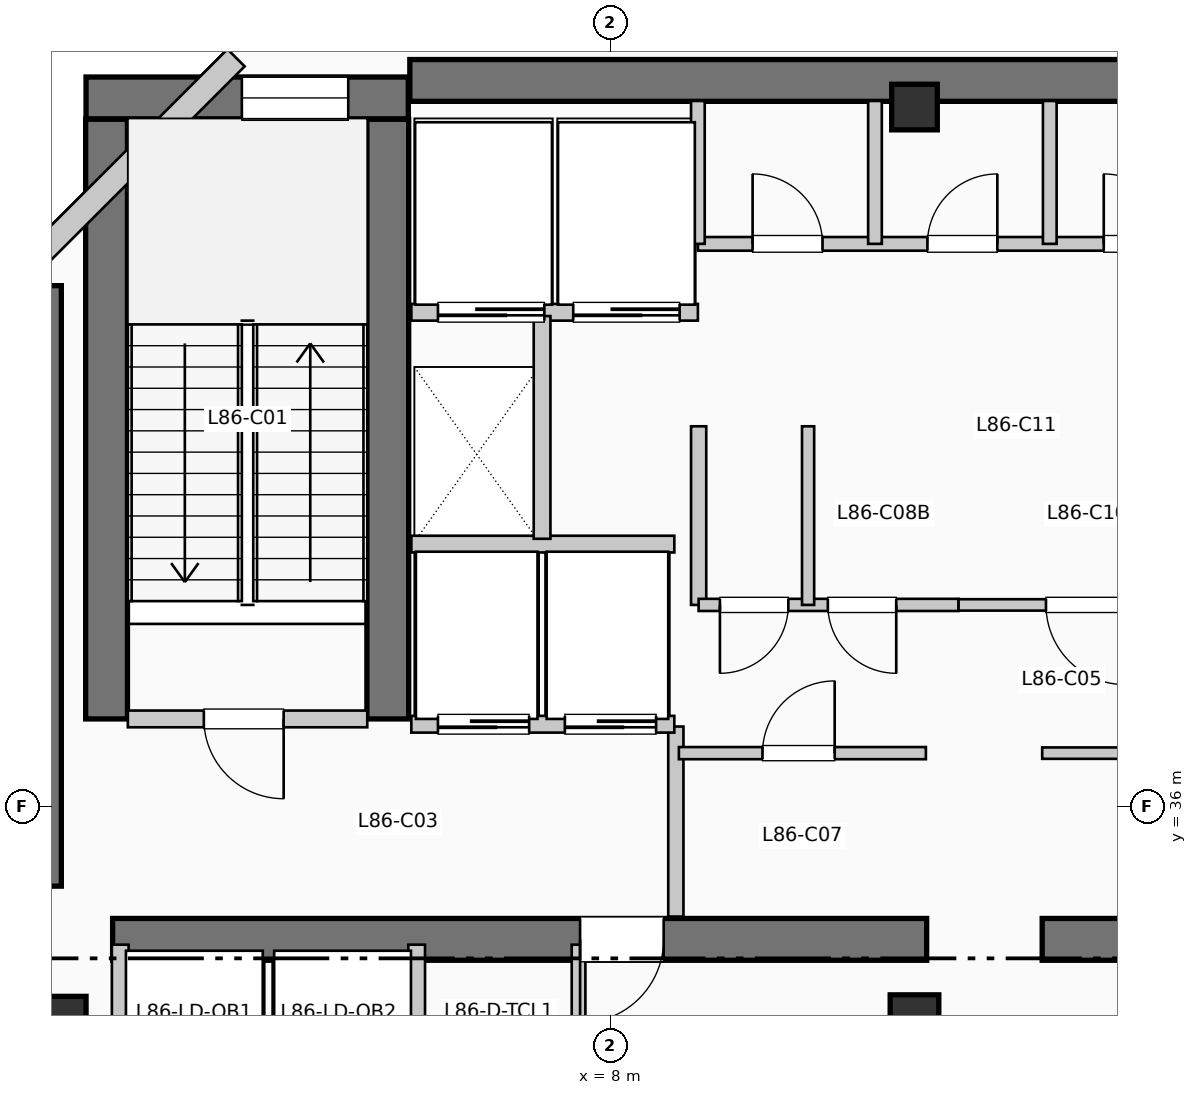
"""IFC4 building model, lengths in metres.
Left out: names, types, materials, properties, quantities, classifications, styles, units other than length and angle.
Written with IfcOpenShell. Run it as: python <this file> out.ifc"""

import sys

from ifc_helpers import new_model, si_unit, direction, frame, frame_2d, origin, origin_2d, place, context, subcontext, project, spatial, rectangle, extrude, element, fill, save


model = new_model("IFC4")
c1 = context("Model", 3, precision=1e-05, world=origin(), true_north=direction((0.0, 1.0)))
c2 = subcontext(c1, "Body", "Model", "MODEL_VIEW")
j1 = project(units=[si_unit("LENGTHUNIT", "METRE"), si_unit("PLANEANGLEUNIT", "RADIAN")], contexts=[c1])
p1 = place(None, origin())
s1 = spatial("IfcSite", under=j1, at=p1, CompositionType="ELEMENT")
p2 = place(p1, origin())
s2 = spatial("IfcBuilding", under=s1, at=p2, CompositionType="ELEMENT")
p3 = place(p2, frame((0.0, 0.0, 352.11)))
s3 = spatial("IfcBuildingStorey", under=s2, at=p3, CompositionType="ELEMENT", Elevation=352.11)
p4 = place(p3, frame((5.36, 45.55, 0.0), z_axis=(0.0, 0.0, 1.0), x_axis=(1.0, 0.0, 0.0)))
e1 = element("IfcWall", 1, at=p4, inside=s3, PredefinedType="SHEAR", context=c2, shape_type="SweptSolid", body=[
    extrude(rectangle(XDim=13.98, YDim=0.55, at=frame_2d((6.99, 0.0))), origin(), (0.0, 0.0, 1.0), 4.62),
])
p5 = place(p3, frame((0.5, 34.95, 0.0), z_axis=(0.0, 0.0, 1.0), x_axis=(0.0, 1.0, 0.0)))
e2 = element("IfcWall", 2, at=p5, inside=s3, PredefinedType="SHEAR", context=c2, shape_type="SweptSolid", body=[
    extrude(rectangle(XDim=7.9, YDim=0.55, at=frame_2d((3.95, 0.0))), origin(), (0.0, 0.0, 1.0), 4.62),
])
p6 = place(p3, frame((1.45, 34.25, 0.0), z_axis=(0.0, 0.0, 1.0), x_axis=(1.0, 0.0, 0.0)))
e3 = element("IfcWall", 3, at=p6, inside=s3, PredefinedType="SHEAR", context=c2, shape_type="SweptSolid", body=[
    extrude(rectangle(XDim=10.71, YDim=0.55, at=frame_2d((5.355, 0.0))), origin(), (0.0, 0.0, 1.0), 4.62),
])
p7 = place(p6, frame((7.25, 0.0, 0.0), z_axis=(0.0, 0.0, 1.0), x_axis=(-1.0, 0.0, 0.0)))
e4 = element("IfcOpeningElement", 4, at=p7, cuts=e3, PredefinedType="OPENING", context=c2, shape_type="SweptSolid", body=[
    extrude(rectangle(XDim=1.1, YDim=2.15, at=frame_2d((0.55, 1.075))), frame((0.0, 0.285, 0.0), z_axis=(0.0, -1.0, 0.0), x_axis=(1.0, 0.0, 0.0)), (0.0, 0.0, 1.0), 0.57),
])
p8 = place(p3, frame((13.68, 34.25, 0.0), z_axis=(0.0, 0.0, 1.0), x_axis=(1.0, 0.0, 0.0)))
e5 = element("IfcWall", 5, at=p8, inside=s3, PredefinedType="SHEAR", context=c2, shape_type="SweptSolid", body=[
    extrude(rectangle(XDim=6.12, YDim=0.55, at=frame_2d((3.06, 0.0))), origin(), (0.0, 0.0, 1.0), 4.62),
])
for number, where, z_axis, x_axis in (
    (6, (1.37, 37.15, 0.0), (0.0, 0.0, 1.0), (0.0, 1.0, 0.0)),
    (7, (5.07, 37.15, 0.0), (0.0, 0.0, 1.0), (0.0, 1.0, 0.0)),
):
    element("IfcWall", number, at=place(p3, frame(where, z_axis=z_axis, x_axis=x_axis)), inside=s3, PredefinedType="SHEAR", context=c2, shape_type="SweptSolid", body=[
        extrude(rectangle(XDim=7.89, YDim=0.55, at=frame_2d((3.945, 0.0))), origin(), (0.0, 0.0, 1.0), 4.62),
    ])
p9 = place(p3, frame((1.1, 45.32, 0.0), z_axis=(0.0, 0.0, 1.0), x_axis=(1.0, 0.0, 0.0)))
e8 = element("IfcWall", 8, at=p9, inside=s3, PredefinedType="SHEAR", context=c2, shape_type="SweptSolid", body=[
    extrude(rectangle(XDim=4.24, YDim=0.55, at=frame_2d((2.12, 0.0))), origin(), (0.0, 0.0, 1.0), 4.62),
])
p10 = place(p9, frame((2.05, 0.0, 1.05)))
e9 = element("IfcOpeningElement", 9, at=p10, cuts=e8, PredefinedType="OPENING", context=c2, shape_type="SweptSolid", body=[
    extrude(rectangle(XDim=1.4, YDim=1.8, at=frame_2d((0.7, 0.9))), frame((0.0, 0.285, 0.0), z_axis=(0.0, -1.0, 0.0), x_axis=(1.0, 0.0, 0.0)), (0.0, 0.0, 1.0), 0.57),
])
p11 = place(p3, frame((0.8, 33.2, 0.0), z_axis=(0.0, 0.0, 1.0), x_axis=(1.0, 0.0, 0.0)))
e10 = element("IfcColumn", 10, at=p11, inside=s3, PredefinedType="COLUMN", context=c2, shape_type="SweptSolid", body=[
    extrude(rectangle(XDim=0.6, YDim=0.6, at=origin_2d()), origin(), (0.0, 0.0, 1.0), 4.62),
])
p12 = place(p3, frame((12.0, 33.2, 0.0), z_axis=(0.0, 0.0, 1.0), x_axis=(1.0, 0.0, 0.0)))
e11 = element("IfcColumn", 11, at=p12, inside=s3, PredefinedType="COLUMN", context=c2, shape_type="SweptSolid", body=[
    extrude(rectangle(XDim=0.64, YDim=0.64, at=origin_2d()), origin(), (0.0, 0.0, 1.0), 4.62),
])
p13 = place(p3, frame((12.0, 45.2, 0.0), z_axis=(0.0, 0.0, 1.0), x_axis=(1.0, 0.0, 0.0)))
e12 = element("IfcColumn", 12, at=p13, inside=s3, PredefinedType="COLUMN", context=c2, shape_type="SweptSolid", body=[
    extrude(rectangle(XDim=0.6, YDim=0.6, at=origin_2d()), origin(), (0.0, 0.0, 1.0), 4.62),
])
p14 = place(p3, frame((3.074, 45.848, 0.0), z_axis=(0.0, 0.0, 1.0), x_axis=(-0.707106781187, -0.707106781187, 0.0)))
e13 = element("IfcWall", 13, at=p14, inside=s3, PredefinedType="SOLIDWALL", context=c2, shape_type="SweptSolid", body=[
    extrude(rectangle(XDim=4.133, YDim=0.32, at=frame_2d((2.066, 0.0))), origin(), (0.0, 0.0, 1.0), 4.37),
])
p15 = place(p3, frame((1.65, 37.15, 0.0), z_axis=(0.0, 0.0, 1.0), x_axis=(1.0, 0.0, 0.0)))
e14 = element("IfcWall", 14, at=p15, inside=s3, PredefinedType="PARTITIONING", context=c2, shape_type="SweptSolid", body=[
    extrude(rectangle(XDim=3.15, YDim=0.22, at=frame_2d((1.575, 0.0))), origin(), (0.0, 0.0, 1.0), 4.37),
])
p16 = place(p15, frame((2.05, 0.0, 0.0), z_axis=(0.0, 0.0, 1.0), x_axis=(-1.0, 0.0, 0.0)))
e15 = element("IfcOpeningElement", 15, at=p16, cuts=e14, PredefinedType="OPENING", context=c2, shape_type="SweptSolid", body=[
    extrude(rectangle(XDim=1.05, YDim=2.15, at=frame_2d((0.525, 1.075))), frame((0.0, 0.12, 0.0), z_axis=(0.0, -1.0, 0.0), x_axis=(1.0, 0.0, 0.0)), (0.0, 0.0, 1.0), 0.24),
])
p17 = place(p3, frame((8.86, 34.55, 0.0), z_axis=(0.0, 0.0, 1.0), x_axis=(0.0, 1.0, 0.0)))
e16 = element("IfcWall", 16, at=p17, inside=s3, PredefinedType="PARTITIONING", context=c2, shape_type="SweptSolid", body=[
    extrude(rectangle(XDim=2.5, YDim=0.2, at=frame_2d((1.25, 0.0))), origin(), (0.0, 0.0, 1.0), 4.37),
])
p18 = place(p3, frame((5.38, 37.08, 0.0), z_axis=(0.0, 0.0, 1.0), x_axis=(1.0, 0.0, 0.0)))
e17 = element("IfcWall", 17, at=p18, inside=s3, PredefinedType="PARTITIONING", context=c2, shape_type="SweptSolid", body=[
    extrude(rectangle(XDim=3.46, YDim=0.22, at=frame_2d((1.73, 0.0))), origin(), (0.0, 0.0, 1.0), 4.37),
])
p19 = place(p18, frame((1.55, 0.0, 0.0), z_axis=(0.0, 0.0, 1.0), x_axis=(-1.0, 0.0, 0.0)))
e18 = element("IfcOpeningElement", 18, at=p19, cuts=e17, PredefinedType="OPENING", context=c2, shape_type="SweptSolid", body=[
    extrude(rectangle(XDim=1.2, YDim=2.2, at=frame_2d((0.6, 1.1))), frame((0.0, 0.12, 0.0), z_axis=(0.0, -1.0, 0.0), x_axis=(1.0, 0.0, 0.0)), (0.0, 0.0, 1.0), 0.24),
])
p20 = place(p18, frame((3.22, 0.0, 0.0), z_axis=(0.0, 0.0, 1.0), x_axis=(-1.0, 0.0, 0.0)))
e19 = element("IfcOpeningElement", 19, at=p20, cuts=e17, PredefinedType="OPENING", context=c2, shape_type="SweptSolid", body=[
    extrude(rectangle(XDim=1.2, YDim=2.2, at=frame_2d((0.6, 1.1))), frame((0.0, 0.12, 0.0), z_axis=(0.0, -1.0, 0.0), x_axis=(1.0, 0.0, 0.0)), (0.0, 0.0, 1.0), 0.24),
])
p21 = place(p3, frame((5.38, 39.45, 0.0), z_axis=(0.0, 0.0, 1.0), x_axis=(1.0, 0.0, 0.0)))
e20 = element("IfcWall", 20, at=p21, inside=s3, PredefinedType="PARTITIONING", context=c2, shape_type="SweptSolid", body=[
    extrude(rectangle(XDim=3.46, YDim=0.22, at=frame_2d((1.73, 0.0))), origin(), (0.0, 0.0, 1.0), 4.37),
])
p22 = place(p3, frame((5.38, 42.5, 0.0), z_axis=(0.0, 0.0, 1.0), x_axis=(1.0, 0.0, 0.0)))
e21 = element("IfcWall", 21, at=p22, inside=s3, PredefinedType="PARTITIONING", context=c2, shape_type="SweptSolid", body=[
    extrude(rectangle(XDim=3.77, YDim=0.22, at=frame_2d((1.885, 0.0))), origin(), (0.0, 0.0, 1.0), 4.37),
])
p23 = place(p22, frame((1.75, 0.0, 0.0), z_axis=(0.0, 0.0, 1.0), x_axis=(-1.0, 0.0, 0.0)))
e22 = element("IfcOpeningElement", 22, at=p23, cuts=e21, PredefinedType="OPENING", context=c2, shape_type="SweptSolid", body=[
    extrude(rectangle(XDim=1.4, YDim=2.2, at=frame_2d((0.7, 1.1))), frame((0.0, 0.12, 0.0), z_axis=(0.0, -1.0, 0.0), x_axis=(1.0, 0.0, 0.0)), (0.0, 0.0, 1.0), 0.24),
])
p24 = place(p22, frame((3.53, 0.0, 0.0), z_axis=(0.0, 0.0, 1.0), x_axis=(-1.0, 0.0, 0.0)))
e23 = element("IfcOpeningElement", 23, at=p24, cuts=e21, PredefinedType="OPENING", context=c2, shape_type="SweptSolid", body=[
    extrude(rectangle(XDim=1.4, YDim=2.2, at=frame_2d((0.7, 1.1))), frame((0.0, 0.12, 0.0), z_axis=(0.0, -1.0, 0.0), x_axis=(1.0, 0.0, 0.0)), (0.0, 0.0, 1.0), 0.24),
])
p25 = place(p3, frame((7.1, 39.52, 0.0), z_axis=(0.0, 0.0, 1.0), x_axis=(0.0, 1.0, 0.0)))
e24 = element("IfcWall", 24, at=p25, inside=s3, PredefinedType="PARTITIONING", context=c2, shape_type="SweptSolid", body=[
    extrude(rectangle(XDim=2.93, YDim=0.22, at=frame_2d((1.465, 0.0))), origin(), (0.0, 0.0, 1.0), 4.37),
])
for number, where, z_axis, x_axis in (
    (25, (1.55, 31.8, 0.0), (0.0, 0.0, 1.0), (0.0, 1.0, 0.0)),
    (26, (5.45, 31.8, 0.0), (0.0, 0.0, 1.0), (0.0, 1.0, 0.0)),
):
    element("IfcWall", number, at=place(p3, frame(where, z_axis=z_axis, x_axis=x_axis)), inside=s3, PredefinedType="PARTITIONING", context=c2, shape_type="SweptSolid", body=[
        extrude(rectangle(XDim=2.38, YDim=0.22, at=frame_2d((1.19, 0.0))), origin(), (0.0, 0.0, 1.0), 4.37),
    ])
p26 = place(p3, frame((9.16, 38.65, 0.0), z_axis=(0.0, 0.0, 1.0), x_axis=(0.0, 1.0, 0.0)))
e27 = element("IfcWall", 27, at=p26, inside=s3, PredefinedType="PARTITIONING", context=c2, shape_type="SweptSolid", body=[
    extrude(rectangle(XDim=2.35, YDim=0.2, at=frame_2d((1.175, 0.0))), origin(), (0.0, 0.0, 1.0), 4.37),
])
p27 = place(p3, frame((7.58, 31.82, 0.0), z_axis=(0.0, 0.0, 1.0), x_axis=(0.0, 1.0, 0.0)))
e28 = element("IfcWall", 28, at=p27, inside=s3, PredefinedType="PLUMBINGWALL", context=c2, shape_type="SweptSolid", body=[
    extrude(rectangle(XDim=2.36, YDim=0.18, at=frame_2d((1.18, 0.0))), origin(), (0.0, 0.0, 1.0), 4.37),
])
p28 = place(p3, frame((8.9, 36.7, 0.0), z_axis=(0.0, 0.0, 1.0), x_axis=(1.0, 0.0, 0.0)))
e29 = element("IfcWall", 29, at=p28, inside=s3, PredefinedType="PARTITIONING", context=c2, shape_type="SweptSolid", body=[
    extrude(rectangle(XDim=3.25, YDim=0.16, at=frame_2d((1.625, 0.0))), origin(), (0.0, 0.0, 1.0), 4.37),
])
p29 = place(p28, frame((1.1, 0.0, 0.0)))
e30 = element("IfcOpeningElement", 30, at=p29, cuts=e29, PredefinedType="OPENING", context=c2, shape_type="SweptSolid", body=[
    extrude(rectangle(XDim=0.95, YDim=2.15, at=frame_2d((0.475, 1.075))), frame((0.0, 0.09, 0.0), z_axis=(0.0, -1.0, 0.0), x_axis=(1.0, 0.0, 0.0)), (0.0, 0.0, 1.0), 0.18),
])
p30 = place(p3, frame((9.16, 38.65, 0.0), z_axis=(0.0, 0.0, 1.0), x_axis=(1.0, 0.0, 0.0)))
e31 = element("IfcWall", 31, at=p30, inside=s3, PredefinedType="PARTITIONING", context=c2, shape_type="SweptSolid", body=[
    extrude(rectangle(XDim=3.42, YDim=0.16, at=frame_2d((1.71, 0.0))), origin(), (0.0, 0.0, 1.0), 4.37),
])
p31 = place(p30, frame((1.18, 0.0, 0.0), z_axis=(0.0, 0.0, 1.0), x_axis=(-1.0, 0.0, 0.0)))
e32 = element("IfcOpeningElement", 32, at=p31, cuts=e31, PredefinedType="OPENING", context=c2, shape_type="SweptSolid", body=[
    extrude(rectangle(XDim=0.9, YDim=2.15, at=frame_2d((0.45, 1.075))), frame((0.0, 0.09, 0.0), z_axis=(0.0, -1.0, 0.0), x_axis=(1.0, 0.0, 0.0)), (0.0, 0.0, 1.0), 0.18),
])
p32 = place(p30, frame((2.6, 0.0, 0.0), z_axis=(0.0, 0.0, 1.0), x_axis=(-1.0, 0.0, 0.0)))
e33 = element("IfcOpeningElement", 33, at=p32, cuts=e31, PredefinedType="OPENING", context=c2, shape_type="SweptSolid", body=[
    extrude(rectangle(XDim=0.9, YDim=2.15, at=frame_2d((0.45, 1.075))), frame((0.0, 0.09, 0.0), z_axis=(0.0, -1.0, 0.0), x_axis=(1.0, 0.0, 0.0)), (0.0, 0.0, 1.0), 0.18),
])
p33 = place(p3, frame((10.6, 38.65, 0.0), z_axis=(0.0, 0.0, 1.0), x_axis=(0.0, 1.0, 0.0)))
e34 = element("IfcWall", 34, at=p33, inside=s3, PredefinedType="PARTITIONING", context=c2, shape_type="SweptSolid", body=[
    extrude(rectangle(XDim=2.35, YDim=0.16, at=frame_2d((1.175, 0.0))), origin(), (0.0, 0.0, 1.0), 4.37),
])
p34 = place(p3, frame((13.68, 36.7, 0.0), z_axis=(0.0, 0.0, 1.0), x_axis=(1.0, 0.0, 0.0)))
e35 = element("IfcWall", 35, at=p34, inside=s3, PredefinedType="PARTITIONING", context=c2, shape_type="SweptSolid", body=[
    extrude(rectangle(XDim=3.28, YDim=0.15, at=frame_2d((1.64, 0.0))), origin(), (0.0, 0.0, 1.0), 4.37),
])
p35 = place(p34, frame((1.15, 0.0, 0.0)))
e36 = element("IfcOpeningElement", 36, at=p35, cuts=e35, PredefinedType="OPENING", context=c2, shape_type="SweptSolid", body=[
    extrude(rectangle(XDim=0.95, YDim=2.15, at=frame_2d((0.475, 1.075))), frame((0.0, 0.085, 0.0), z_axis=(0.0, -1.0, 0.0), x_axis=(1.0, 0.0, 0.0)), (0.0, 0.0, 1.0), 0.17),
])
p36 = place(p3, frame((12.58, 38.65, 0.0), z_axis=(0.0, 0.0, 1.0), x_axis=(1.0, 0.0, 0.0)))
e37 = element("IfcWall", 37, at=p36, inside=s3, PredefinedType="PARTITIONING", context=c2, shape_type="SweptSolid", body=[
    extrude(rectangle(XDim=3.38, YDim=0.15, at=frame_2d((1.69, 0.0))), origin(), (0.0, 0.0, 1.0), 4.37),
])
p37 = place(p36, frame((2.2, 0.0, 0.0), z_axis=(0.0, 0.0, 1.0), x_axis=(-1.0, 0.0, 0.0)))
e38 = element("IfcOpeningElement", 38, at=p37, cuts=e37, PredefinedType="OPENING", context=c2, shape_type="SweptSolid", body=[
    extrude(rectangle(XDim=1.05, YDim=2.15, at=frame_2d((0.525, 1.075))), frame((0.0, 0.085, 0.0), z_axis=(0.0, -1.0, 0.0), x_axis=(1.0, 0.0, 0.0)), (0.0, 0.0, 1.0), 0.17),
])
p38 = place(p3, frame((9.15, 43.4, 0.0), z_axis=(0.0, 0.0, 1.0), x_axis=(1.0, 0.0, 0.0)))
e39 = element("IfcWall", 39, at=p38, inside=s3, PredefinedType="PLUMBINGWALL", context=c2, shape_type="SweptSolid", body=[
    extrude(rectangle(XDim=9.33, YDim=0.18, at=frame_2d((4.665, 0.0))), origin(), (0.0, 0.0, 1.0), 4.37),
])
p39 = place(p38, frame((0.72, 0.0, 0.0)))
e40 = element("IfcOpeningElement", 40, at=p39, cuts=e39, PredefinedType="OPENING", context=c2, shape_type="SweptSolid", body=[
    extrude(rectangle(XDim=0.92, YDim=2.1, at=frame_2d((0.46, 1.05))), frame((0.0, 0.1, 0.0), z_axis=(0.0, -1.0, 0.0), x_axis=(1.0, 0.0, 0.0)), (0.0, 0.0, 1.0), 0.2),
])
p40 = place(p38, frame((3.02, 0.0, 0.0)))
e41 = element("IfcOpeningElement", 41, at=p40, cuts=e39, PredefinedType="OPENING", context=c2, shape_type="SweptSolid", body=[
    extrude(rectangle(XDim=0.92, YDim=2.1, at=frame_2d((0.46, 1.05))), frame((0.0, 0.1, 0.0), z_axis=(0.0, -1.0, 0.0), x_axis=(1.0, 0.0, 0.0)), (0.0, 0.0, 1.0), 0.2),
])
p41 = place(p38, frame((5.34, 0.0, 0.0)))
e42 = element("IfcOpeningElement", 42, at=p41, cuts=e39, PredefinedType="OPENING", context=c2, shape_type="SweptSolid", body=[
    extrude(rectangle(XDim=0.92, YDim=2.1, at=frame_2d((0.46, 1.05))), frame((0.0, 0.1, 0.0), z_axis=(0.0, -1.0, 0.0), x_axis=(1.0, 0.0, 0.0)), (0.0, 0.0, 1.0), 0.2),
])
p42 = place(p38, frame((7.66, 0.0, 0.0)))
e43 = element("IfcOpeningElement", 43, at=p42, cuts=e39, PredefinedType="OPENING", context=c2, shape_type="SweptSolid", body=[
    extrude(rectangle(XDim=0.95, YDim=2.1, at=frame_2d((0.475, 1.05))), frame((0.0, 0.1, 0.0), z_axis=(0.0, -1.0, 0.0), x_axis=(1.0, 0.0, 0.0)), (0.0, 0.0, 1.0), 0.2),
])
for number, where, z_axis, x_axis in (
    (44, (9.15, 43.4, 0.0), (0.0, 0.0, 1.0), (0.0, 1.0, 0.0)),
    (45, (11.48, 43.4, 0.0), (0.0, 0.0, 1.0), (0.0, 1.0, 0.0)),
    (46, (13.78, 43.4, 0.0), (0.0, 0.0, 1.0), (0.0, 1.0, 0.0)),
):
    element("IfcWall", number, at=place(p3, frame(where, z_axis=z_axis, x_axis=x_axis)), inside=s3, PredefinedType="PLUMBINGWALL", context=c2, shape_type="SweptSolid", body=[
        extrude(rectangle(XDim=1.88, YDim=0.18, at=frame_2d((0.94, 0.0))), origin(), (0.0, 0.0, 1.0), 4.37),
    ])
p43 = place(p10, origin())
e47 = element("IfcWindow", 47, at=p43, inside=s3, PartitioningType="SINGLE_PANEL", PredefinedType="WINDOW", context=c2, shape_type="SweptSolid", body=[
    extrude(rectangle(XDim=1.4, YDim=1.8, at=frame_2d((0.7, 0.9))), frame((0.0, 0.03, 0.0), z_axis=(0.0, -1.0, 0.0), x_axis=(1.0, 0.0, 0.0)), (0.0, 0.0, 1.0), 0.06),
])
fill(e9, e47)
p44 = place(p16, origin())
e48 = element("IfcDoor", 48, at=p44, inside=s3, OperationType="SINGLE_SWING_RIGHT", PredefinedType="DOOR", context=c2, shape_type="SweptSolid", body=[
    extrude(rectangle(XDim=1.05, YDim=2.15, at=frame_2d((0.525, 1.075))), frame((0.0, 0.025, 0.0), z_axis=(0.0, -1.0, 0.0), x_axis=(1.0, 0.0, 0.0)), (0.0, 0.0, 1.0), 0.05),
])
fill(e15, e48)
p45 = place(p7, origin())
e49 = element("IfcDoor", 49, at=p45, inside=s3, OperationType="SINGLE_SWING_LEFT", PredefinedType="DOOR", context=c2, shape_type="SweptSolid", body=[
    extrude(rectangle(XDim=1.1, YDim=2.15, at=frame_2d((0.55, 1.075))), frame((0.0, 0.025, 0.0), z_axis=(0.0, -1.0, 0.0), x_axis=(1.0, 0.0, 0.0)), (0.0, 0.0, 1.0), 0.05),
])
fill(e4, e49)
p46 = place(p19, origin())
e50 = element("IfcDoor", 50, at=p46, inside=s3, OperationType="SLIDING_TO_RIGHT", PredefinedType="DOOR", context=c2, shape_type="SweptSolid", body=[
    extrude(rectangle(XDim=1.2, YDim=2.2, at=frame_2d((0.6, 1.1))), frame((0.0, 0.025, 0.0), z_axis=(0.0, -1.0, 0.0), x_axis=(1.0, 0.0, 0.0)), (0.0, 0.0, 1.0), 0.05),
])
fill(e18, e50)
p47 = place(p20, origin())
e51 = element("IfcDoor", 51, at=p47, inside=s3, OperationType="SLIDING_TO_RIGHT", PredefinedType="DOOR", context=c2, shape_type="SweptSolid", body=[
    extrude(rectangle(XDim=1.2, YDim=2.2, at=frame_2d((0.6, 1.1))), frame((0.0, 0.025, 0.0), z_axis=(0.0, -1.0, 0.0), x_axis=(1.0, 0.0, 0.0)), (0.0, 0.0, 1.0), 0.05),
])
fill(e19, e51)
p48 = place(p23, origin())
e52 = element("IfcDoor", 52, at=p48, inside=s3, OperationType="SLIDING_TO_LEFT", PredefinedType="DOOR", context=c2, shape_type="SweptSolid", body=[
    extrude(rectangle(XDim=1.4, YDim=2.2, at=frame_2d((0.7, 1.1))), frame((0.0, 0.025, 0.0), z_axis=(0.0, -1.0, 0.0), x_axis=(1.0, 0.0, 0.0)), (0.0, 0.0, 1.0), 0.05),
])
fill(e22, e52)
p49 = place(p24, origin())
e53 = element("IfcDoor", 53, at=p49, inside=s3, OperationType="SLIDING_TO_LEFT", PredefinedType="DOOR", context=c2, shape_type="SweptSolid", body=[
    extrude(rectangle(XDim=1.4, YDim=2.2, at=frame_2d((0.7, 1.1))), frame((0.0, 0.025, 0.0), z_axis=(0.0, -1.0, 0.0), x_axis=(1.0, 0.0, 0.0)), (0.0, 0.0, 1.0), 0.05),
])
fill(e23, e53)
p50 = place(p29, origin())
e54 = element("IfcDoor", 54, at=p50, inside=s3, OperationType="SINGLE_SWING_RIGHT", PredefinedType="DOOR", context=c2, shape_type="SweptSolid", body=[
    extrude(rectangle(XDim=0.95, YDim=2.15, at=frame_2d((0.475, 1.075))), frame((0.0, 0.025, 0.0), z_axis=(0.0, -1.0, 0.0), x_axis=(1.0, 0.0, 0.0)), (0.0, 0.0, 1.0), 0.05),
])
fill(e30, e54)
p51 = place(p31, origin())
e55 = element("IfcDoor", 55, at=p51, inside=s3, OperationType="SINGLE_SWING_LEFT", PredefinedType="DOOR", context=c2, shape_type="SweptSolid", body=[
    extrude(rectangle(XDim=0.9, YDim=2.15, at=frame_2d((0.45, 1.075))), frame((0.0, 0.025, 0.0), z_axis=(0.0, -1.0, 0.0), x_axis=(1.0, 0.0, 0.0)), (0.0, 0.0, 1.0), 0.05),
])
fill(e32, e55)
p52 = place(p32, origin())
e56 = element("IfcDoor", 56, at=p52, inside=s3, OperationType="SINGLE_SWING_RIGHT", PredefinedType="DOOR", context=c2, shape_type="SweptSolid", body=[
    extrude(rectangle(XDim=0.9, YDim=2.15, at=frame_2d((0.45, 1.075))), frame((0.0, 0.025, 0.0), z_axis=(0.0, -1.0, 0.0), x_axis=(1.0, 0.0, 0.0)), (0.0, 0.0, 1.0), 0.05),
])
fill(e33, e56)
p53 = place(p37, origin())
e57 = element("IfcDoor", 57, at=p53, inside=s3, OperationType="SINGLE_SWING_RIGHT", PredefinedType="DOOR", context=c2, shape_type="SweptSolid", body=[
    extrude(rectangle(XDim=1.05, YDim=2.15, at=frame_2d((0.525, 1.075))), frame((0.0, 0.025, 0.0), z_axis=(0.0, -1.0, 0.0), x_axis=(1.0, 0.0, 0.0)), (0.0, 0.0, 1.0), 0.05),
])
fill(e38, e57)
p54 = place(p39, origin())
e58 = element("IfcDoor", 58, at=p54, inside=s3, OperationType="SINGLE_SWING_LEFT", PredefinedType="DOOR", context=c2, shape_type="SweptSolid", body=[
    extrude(rectangle(XDim=0.92, YDim=2.1, at=frame_2d((0.46, 1.05))), frame((0.0, 0.025, 0.0), z_axis=(0.0, -1.0, 0.0), x_axis=(1.0, 0.0, 0.0)), (0.0, 0.0, 1.0), 0.05),
])
fill(e40, e58)
p55 = place(p40, origin())
e59 = element("IfcDoor", 59, at=p55, inside=s3, OperationType="SINGLE_SWING_RIGHT", PredefinedType="DOOR", context=c2, shape_type="SweptSolid", body=[
    extrude(rectangle(XDim=0.92, YDim=2.1, at=frame_2d((0.46, 1.05))), frame((0.0, 0.025, 0.0), z_axis=(0.0, -1.0, 0.0), x_axis=(1.0, 0.0, 0.0)), (0.0, 0.0, 1.0), 0.05),
])
fill(e41, e59)
p56 = place(p41, origin())
e60 = element("IfcDoor", 60, at=p56, inside=s3, OperationType="SINGLE_SWING_LEFT", PredefinedType="DOOR", context=c2, shape_type="SweptSolid", body=[
    extrude(rectangle(XDim=0.92, YDim=2.1, at=frame_2d((0.46, 1.05))), frame((0.0, 0.025, 0.0), z_axis=(0.0, -1.0, 0.0), x_axis=(1.0, 0.0, 0.0)), (0.0, 0.0, 1.0), 0.05),
])
fill(e42, e60)
save(model, sys.argv[1])
